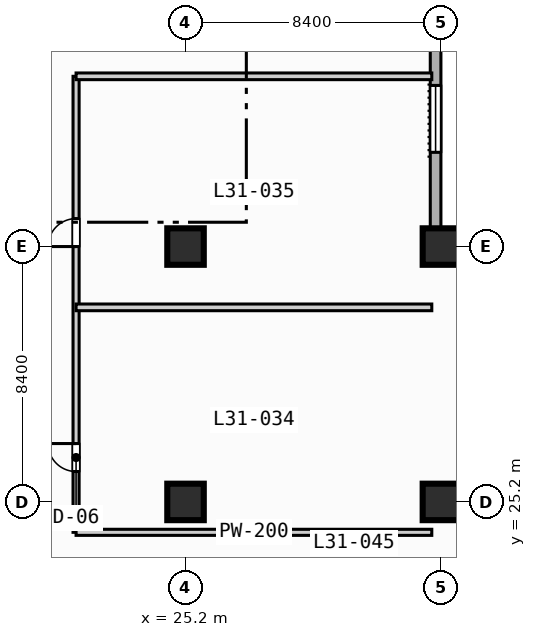
"""IFC4 building model, lengths in metres.
Left out: names, types, materials, properties, quantities, classifications, styles, units other than length and angle.
Written with IfcOpenShell. Run it as: python <this file> out.ifc"""

import sys

from ifc_helpers import new_model, si_unit, direction, frame, frame_2d, origin, origin_2d, place, context, subcontext, project, spatial, rectangle, extrude, element, fill, save


model = new_model("IFC4")
c1 = context("Model", 3, precision=1e-05, world=origin(), true_north=direction((0.0, 1.0)))
c2 = subcontext(c1, "Body", "Model", "MODEL_VIEW")
j1 = project(units=[si_unit("LENGTHUNIT", "METRE"), si_unit("PLANEANGLEUNIT", "RADIAN")], contexts=[c1])
p1 = place(None, origin())
s1 = spatial("IfcSite", under=j1, at=p1, CompositionType="ELEMENT")
p2 = place(p1, origin())
s2 = spatial("IfcBuilding", under=s1, at=p2, CompositionType="ELEMENT")
p3 = place(p2, frame((0.0, 0.0, 130.4)))
s3 = spatial("IfcBuildingStorey", under=s2, at=p3, CompositionType="ELEMENT", Elevation=130.4)
for number, where, z_axis, x_axis in (
    (1, (25.2, 25.2, 0.0), (0.0, 0.0, 1.0), (1.0, 0.0, 0.0)),
    (2, (25.2, 33.6, 0.0), (0.0, 0.0, 1.0), (1.0, 0.0, 0.0)),
    (3, (33.6, 25.2, 0.0), (0.0, 0.0, 1.0), (1.0, 0.0, 0.0)),
    (4, (33.6, 33.6, 0.0), (0.0, 0.0, 1.0), (1.0, 0.0, 0.0)),
):
    element("IfcColumn", number, at=place(p3, frame(where, z_axis=z_axis, x_axis=x_axis)), inside=s3, PredefinedType="COLUMN", context=c2, shape_type="SweptSolid", body=[
        extrude(rectangle(XDim=1.2, YDim=1.2, at=origin_2d()), origin(), (0.0, 0.0, 1.0), 3.8),
    ])
p4 = place(p3, frame((33.425, 89.225, 0.0), z_axis=(0.0, 0.0, 1.0), x_axis=(0.0, -1.0, 0.0)))
e5 = element("IfcWall", 5, at=p4, inside=s3, PredefinedType="STANDARD", context=c2, shape_type="SweptSolid", body=[
    extrude(rectangle(XDim=55.8, YDim=0.35, at=frame_2d((27.9, 0.0))), origin(), (0.0, 0.0, 1.0), 3.55),
])
p5 = place(p4, frame((50.325, 0.0, 0.85)))
e6 = element("IfcOpeningElement", 6, at=p5, cuts=e5, PredefinedType="OPENING", context=c2, shape_type="SweptSolid", body=[
    extrude(rectangle(XDim=2.2, YDim=1.8, at=frame_2d((1.1, 0.9))), frame((0.0, 0.185, 0.0), z_axis=(0.0, -1.0, 0.0), x_axis=(1.0, 0.0, 0.0)), (0.0, 0.0, 1.0), 0.37),
])
p6 = place(p4, frame((33.525, 0.0, 0.85)))
e7 = element("IfcOpeningElement", 7, at=p6, cuts=e5, PredefinedType="OPENING", context=c2, shape_type="SweptSolid", body=[
    extrude(rectangle(XDim=2.2, YDim=1.8, at=frame_2d((1.1, 0.9))), frame((0.0, 0.185, 0.0), z_axis=(0.0, -1.0, 0.0), x_axis=(1.0, 0.0, 0.0)), (0.0, 0.0, 1.0), 0.37),
])
p7 = place(p4, frame((25.125, 0.0, 0.85)))
e8 = element("IfcOpeningElement", 8, at=p7, cuts=e5, PredefinedType="OPENING", context=c2, shape_type="SweptSolid", body=[
    extrude(rectangle(XDim=2.2, YDim=1.8, at=frame_2d((1.1, 0.9))), frame((0.0, 0.185, 0.0), z_axis=(0.0, -1.0, 0.0), x_axis=(1.0, 0.0, 0.0)), (0.0, 0.0, 1.0), 0.37),
])
p8 = place(p4, frame((16.725, 0.0, 0.85)))
e9 = element("IfcOpeningElement", 9, at=p8, cuts=e5, PredefinedType="OPENING", context=c2, shape_type="SweptSolid", body=[
    extrude(rectangle(XDim=2.2, YDim=1.8, at=frame_2d((1.1, 0.9))), frame((0.0, 0.185, 0.0), z_axis=(0.0, -1.0, 0.0), x_axis=(1.0, 0.0, 0.0)), (0.0, 0.0, 1.0), 0.37),
])
p9 = place(p4, frame((8.325, 0.0, 0.85)))
e10 = element("IfcOpeningElement", 10, at=p9, cuts=e5, PredefinedType="OPENING", context=c2, shape_type="SweptSolid", body=[
    extrude(rectangle(XDim=2.2, YDim=1.8, at=frame_2d((1.1, 0.9))), frame((0.0, 0.185, 0.0), z_axis=(0.0, -1.0, 0.0), x_axis=(1.0, 0.0, 0.0)), (0.0, 0.0, 1.0), 0.37),
])
p10 = place(p3, frame((33.425, 33.425, 0.0), z_axis=(0.0, 0.0, 1.0), x_axis=(1.0, 0.0, 0.0)))
e11 = element("IfcWall", 11, at=p10, inside=s3, PredefinedType="STANDARD", context=c2, shape_type="SweptSolid", body=[
    extrude(rectangle(XDim=39.0, YDim=0.35, at=frame_2d((19.5, 0.0))), origin(), (0.0, 0.0, 1.0), 3.55),
])
p11 = place(p10, frame((12.075, 0.0, 0.0)))
e12 = element("IfcOpeningElement", 12, at=p11, cuts=e11, PredefinedType="OPENING", context=c2, shape_type="SweptSolid", body=[
    extrude(rectangle(XDim=1.4, YDim=2.2, at=frame_2d((0.7, 1.1))), frame((0.0, 0.185, 0.0), z_axis=(0.0, -1.0, 0.0), x_axis=(1.0, 0.0, 0.0)), (0.0, 0.0, 1.0), 0.37),
])
p12 = place(p3, frame((21.6, 24.2, 0.0), z_axis=(0.0, 0.0, 1.0), x_axis=(0.0, 1.0, 0.0)))
e13 = element("IfcWall", 13, at=p12, inside=s3, PredefinedType="PARTITIONING", context=c2, shape_type="SweptSolid", body=[
    extrude(rectangle(XDim=15.0, YDim=0.2, at=frame_2d((7.5, 0.0))), origin(), (0.0, 0.0, 1.0), 3.55),
])
p13 = place(p12, frame((2.0, 0.0, 0.0)))
e14 = element("IfcOpeningElement", 14, at=p13, cuts=e13, PredefinedType="OPENING", context=c2, shape_type="SweptSolid", body=[
    extrude(rectangle(XDim=0.92, YDim=2.1, at=frame_2d((0.46, 1.05))), frame((0.0, 0.11, 0.0), z_axis=(0.0, -1.0, 0.0), x_axis=(1.0, 0.0, 0.0)), (0.0, 0.0, 1.0), 0.22),
])
p14 = place(p12, frame((9.4, 0.0, 0.0)))
e15 = element("IfcOpeningElement", 15, at=p14, cuts=e13, PredefinedType="OPENING", context=c2, shape_type="SweptSolid", body=[
    extrude(rectangle(XDim=0.92, YDim=2.1, at=frame_2d((0.46, 1.05))), frame((0.0, 0.11, 0.0), z_axis=(0.0, -1.0, 0.0), x_axis=(1.0, 0.0, 0.0)), (0.0, 0.0, 1.0), 0.22),
])
p15 = place(p3, frame((21.6, 24.2, 0.0), z_axis=(0.0, 0.0, 1.0), x_axis=(1.0, 0.0, 0.0)))
e16 = element("IfcWall", 16, at=p15, inside=s3, PredefinedType="PARTITIONING", context=c2, shape_type="SweptSolid", body=[
    extrude(rectangle(XDim=11.7, YDim=0.2, at=frame_2d((5.85, 0.0))), origin(), (0.0, 0.0, 1.0), 3.55),
])
for number, where, z_axis, x_axis in (
    (17, (21.6, 31.6, 0.0), (0.0, 0.0, 1.0), (1.0, 0.0, 0.0)),
    (18, (21.6, 39.2, 0.0), (0.0, 0.0, 1.0), (1.0, 0.0, 0.0)),
):
    element("IfcWall", number, at=place(p3, frame(where, z_axis=z_axis, x_axis=x_axis)), inside=s3, PredefinedType="PARTITIONING", context=c2, shape_type="SweptSolid", body=[
        extrude(rectangle(XDim=11.7, YDim=0.22, at=frame_2d((5.85, 0.0))), origin(), (0.0, 0.0, 1.0), 3.55),
    ])
p16 = place(p5, origin())
e19 = element("IfcWindow", 19, at=p16, inside=s3, PartitioningType="SINGLE_PANEL", PredefinedType="WINDOW", context=c2, shape_type="SweptSolid", body=[
    extrude(rectangle(XDim=2.2, YDim=1.8, at=frame_2d((1.1, 0.9))), frame((0.0, 0.03, 0.0), z_axis=(0.0, -1.0, 0.0), x_axis=(1.0, 0.0, 0.0)), (0.0, 0.0, 1.0), 0.06),
])
fill(e6, e19)
p17 = place(p13, origin())
e20 = element("IfcDoor", 20, at=p17, inside=s3, OperationType="SINGLE_SWING_RIGHT", PredefinedType="DOOR", context=c2, shape_type="SweptSolid", body=[
    extrude(rectangle(XDim=0.92, YDim=2.1, at=frame_2d((0.46, 1.05))), frame((0.0, 0.025, 0.0), z_axis=(0.0, -1.0, 0.0), x_axis=(1.0, 0.0, 0.0)), (0.0, 0.0, 1.0), 0.05),
])
fill(e14, e20)
p18 = place(p14, origin())
e21 = element("IfcDoor", 21, at=p18, inside=s3, OperationType="SINGLE_SWING_LEFT", PredefinedType="DOOR", context=c2, shape_type="SweptSolid", body=[
    extrude(rectangle(XDim=0.92, YDim=2.1, at=frame_2d((0.46, 1.05))), frame((0.0, 0.025, 0.0), z_axis=(0.0, -1.0, 0.0), x_axis=(1.0, 0.0, 0.0)), (0.0, 0.0, 1.0), 0.05),
])
fill(e15, e21)
save(model, sys.argv[1])
